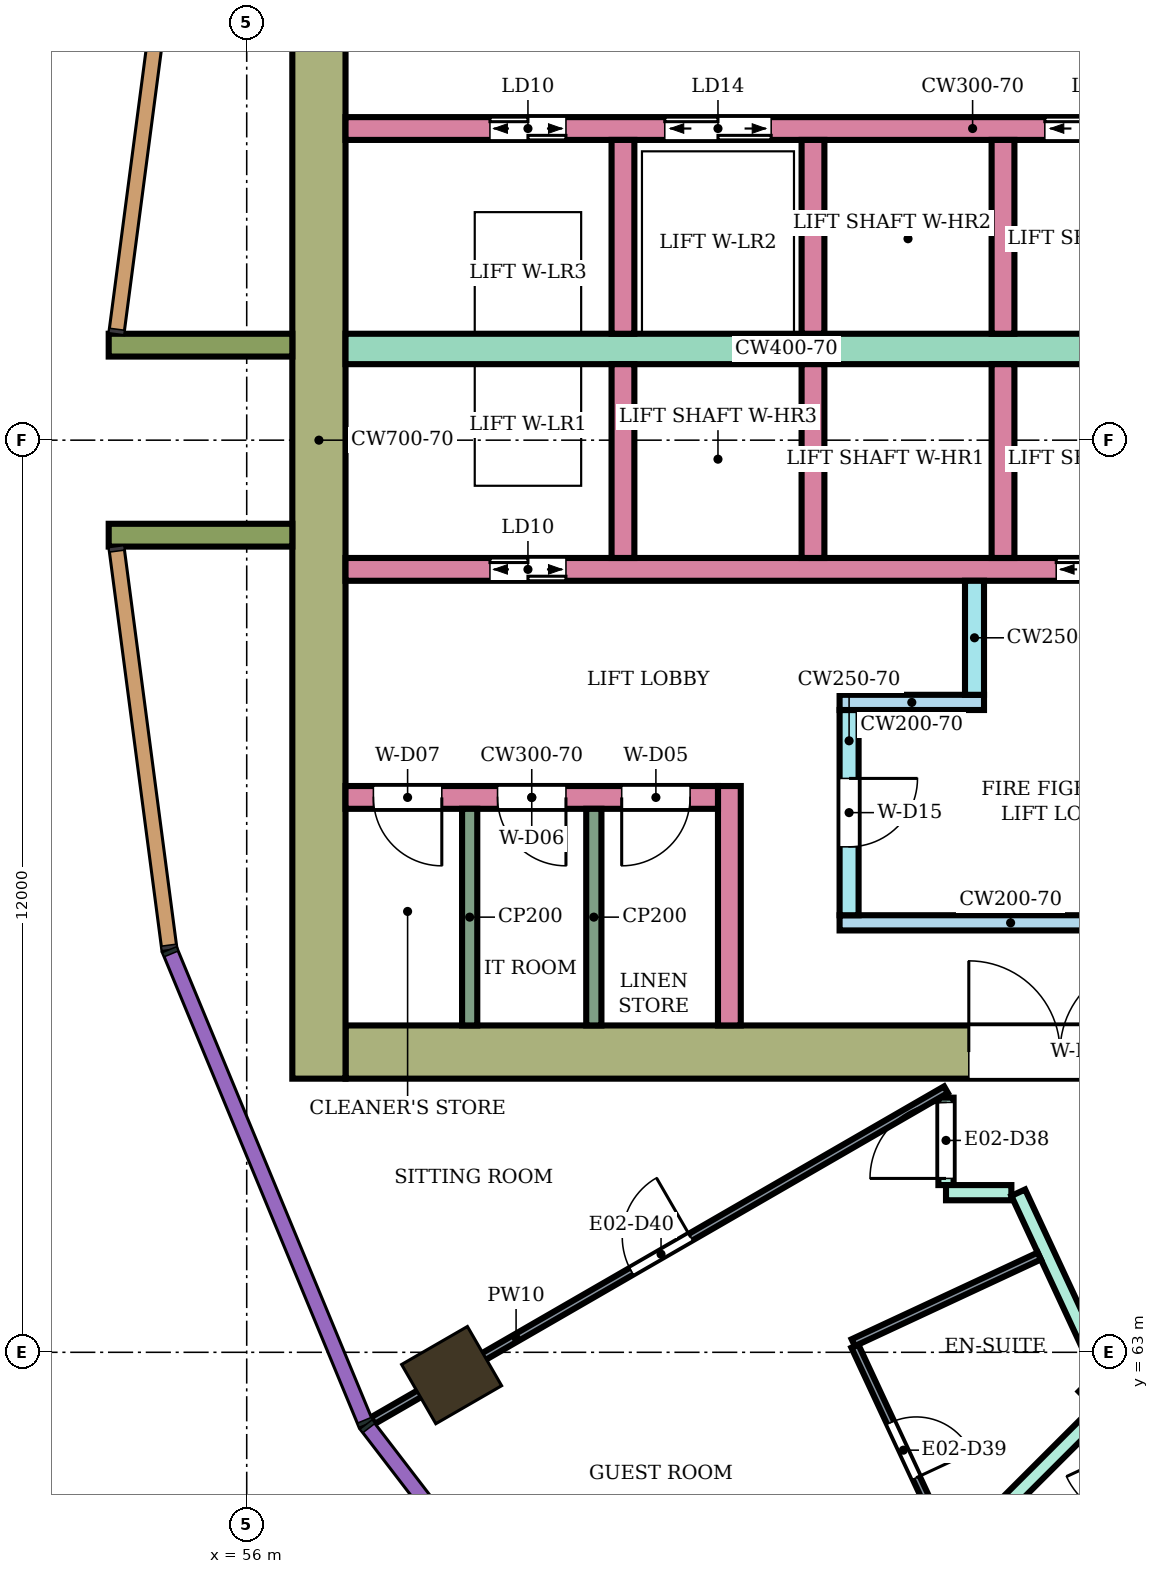
"""IFC4 building model, lengths in metres.
Left out: names, types, materials, properties, quantities, classifications, styles, units other than length and angle.
Written with IfcOpenShell. Run it as: python <this file> out.ifc"""

import sys

from ifc_helpers import new_model, si_unit, direction, frame, frame_2d, origin, origin_2d, place, context, subcontext, project, spatial, rectangle, extrude, element, fill, save


model = new_model("IFC4")
c1 = context("Model", 3, precision=1e-05, world=origin(), true_north=direction((0.0, 1.0)))
c2 = subcontext(c1, "Body", "Model", "MODEL_VIEW")
j1 = project(units=[si_unit("LENGTHUNIT", "METRE"), si_unit("PLANEANGLEUNIT", "RADIAN")], contexts=[c1])
p1 = place(None, origin())
s1 = spatial("IfcSite", under=j1, at=p1, CompositionType="ELEMENT")
p2 = place(p1, origin())
s2 = spatial("IfcBuilding", under=s1, at=p2, CompositionType="ELEMENT")
p3 = place(p2, frame((0.0, 0.0, 130.2)))
s3 = spatial("IfcBuildingStorey", under=s2, at=p3, CompositionType="ELEMENT", Elevation=130.2)
p4 = place(p3, frame((58.696, 62.7, 0.0), z_axis=(0.0, 0.0, 1.0), x_axis=(-0.866025403784, -0.5, 0.0)))
e1 = element("IfcColumn", 1, at=p4, inside=s3, PredefinedType="COLUMN", context=c2, shape_type="SweptSolid", body=[
    extrude(rectangle(XDim=1.0, YDim=0.9, at=origin_2d()), origin(), (0.0, 0.0, 1.0), 3.9),
])
p5 = place(p3, frame((67.555, 62.555, 0.0), z_axis=(0.0, 0.0, 1.0), x_axis=(-0.707106781187, -0.707106781187, 0.0)))
e2 = element("IfcColumn", 2, at=p5, inside=s3, PredefinedType="COLUMN", context=c2, shape_type="SweptSolid", body=[
    extrude(rectangle(XDim=1.0, YDim=0.8, at=origin_2d()), origin(), (0.0, 0.0, 1.0), 3.9),
])
p6 = place(p3, frame((72.1, 66.95, 0.0), z_axis=(0.0, 0.0, 1.0), x_axis=(-1.0, 0.0, 0.0)))
e3 = element("IfcWall", 3, at=p6, inside=s3, PredefinedType="SHEAR", context=c2, shape_type="SweptSolid", body=[
    extrude(rectangle(XDim=14.8, YDim=0.7, at=frame_2d((7.4, 0.0))), origin(), (0.0, 0.0, 1.0), 3.58),
])
p7 = place(p6, frame((4.2, 0.0, 0.0)))
e4 = element("IfcOpeningElement", 4, at=p7, cuts=e3, PredefinedType="OPENING", context=c2, shape_type="SweptSolid", body=[
    extrude(rectangle(XDim=2.4, YDim=2.4, at=frame_2d((1.2, 1.2))), frame((0.0, 0.36, 0.0), z_axis=(0.0, -1.0, 0.0), x_axis=(1.0, 0.0, 0.0)), (0.0, 0.0, 1.0), 0.72),
])
p8 = place(p3, frame((56.95, 83.4, 0.0), z_axis=(0.0, 0.0, 1.0), x_axis=(0.0, -1.0, 0.0)))
e5 = element("IfcWall", 5, at=p8, inside=s3, PredefinedType="SHEAR", context=c2, shape_type="SweptSolid", body=[
    extrude(rectangle(XDim=16.8, YDim=0.7, at=frame_2d((8.4, 0.0))), origin(), (0.0, 0.0, 1.0), 3.58),
])
p9 = place(p3, frame((68.3, 73.3, 0.0), z_axis=(0.0, 0.0, 1.0), x_axis=(-1.0, 0.0, 0.0)))
e6 = element("IfcWall", 6, at=p9, inside=s3, PredefinedType="SHEAR", context=c2, shape_type="SweptSolid", body=[
    extrude(rectangle(XDim=11.0, YDim=0.3, at=frame_2d((5.5, 0.0))), origin(), (0.0, 0.0, 1.0), 3.58),
])
p10 = place(p9, frame((0.55, 0.0, 0.0)))
e7 = element("IfcOpeningElement", 7, at=p10, cuts=e6, PredefinedType="OPENING", context=c2, shape_type="SweptSolid", body=[
    extrude(rectangle(XDim=1.1, YDim=2.1, at=frame_2d((0.55, 1.05))), frame((0.0, 0.16, 0.0), z_axis=(0.0, -1.0, 0.0), x_axis=(1.0, 0.0, 0.0)), (0.0, 0.0, 1.0), 0.32),
])
p11 = place(p9, frame((8.1, 0.0, 0.0)))
e8 = element("IfcOpeningElement", 8, at=p11, cuts=e6, PredefinedType="OPENING", context=c2, shape_type="SweptSolid", body=[
    extrude(rectangle(XDim=1.0, YDim=2.1, at=frame_2d((0.5, 1.05))), frame((0.0, 0.16, 0.0), z_axis=(0.0, -1.0, 0.0), x_axis=(1.0, 0.0, 0.0)), (0.0, 0.0, 1.0), 0.32),
])
p12 = place(p3, frame((68.3, 76.2, 0.0), z_axis=(0.0, 0.0, 1.0), x_axis=(-1.0, 0.0, 0.0)))
e9 = element("IfcWall", 9, at=p12, inside=s3, PredefinedType="SHEAR", context=c2, shape_type="SweptSolid", body=[
    extrude(rectangle(XDim=11.0, YDim=0.4, at=frame_2d((5.5, 0.0))), origin(), (0.0, 0.0, 1.0), 3.58),
])
p13 = place(p3, frame((68.3, 79.1, 0.0), z_axis=(0.0, 0.0, 1.0), x_axis=(-1.0, 0.0, 0.0)))
e10 = element("IfcWall", 10, at=p13, inside=s3, PredefinedType="SHEAR", context=c2, shape_type="SweptSolid", body=[
    extrude(rectangle(XDim=11.0, YDim=0.3, at=frame_2d((5.5, 0.0))), origin(), (0.0, 0.0, 1.0), 3.58),
])
p14 = place(p13, frame((0.4, 0.0, 0.0)))
e11 = element("IfcOpeningElement", 11, at=p14, cuts=e10, PredefinedType="OPENING", context=c2, shape_type="SweptSolid", body=[
    extrude(rectangle(XDim=1.4, YDim=2.1, at=frame_2d((0.7, 1.05))), frame((0.0, 0.16, 0.0), z_axis=(0.0, -1.0, 0.0), x_axis=(1.0, 0.0, 0.0)), (0.0, 0.0, 1.0), 0.32),
])
p15 = place(p13, frame((5.4, 0.0, 0.0)))
e12 = element("IfcOpeningElement", 12, at=p15, cuts=e10, PredefinedType="OPENING", context=c2, shape_type="SweptSolid", body=[
    extrude(rectangle(XDim=1.4, YDim=2.1, at=frame_2d((0.7, 1.05))), frame((0.0, 0.16, 0.0), z_axis=(0.0, -1.0, 0.0), x_axis=(1.0, 0.0, 0.0)), (0.0, 0.0, 1.0), 0.32),
])
p16 = place(p13, frame((8.1, 0.0, 0.0)))
e13 = element("IfcOpeningElement", 13, at=p16, cuts=e10, PredefinedType="OPENING", context=c2, shape_type="SweptSolid", body=[
    extrude(rectangle(XDim=1.0, YDim=2.1, at=frame_2d((0.5, 1.05))), frame((0.0, 0.16, 0.0), z_axis=(0.0, -1.0, 0.0), x_axis=(1.0, 0.0, 0.0)), (0.0, 0.0, 1.0), 0.32),
])
for number, where, z_axis, x_axis in (
    (14, (65.95, 76.0, 0.0), (0.0, 0.0, 1.0), (0.0, -1.0, 0.0)),
    (15, (63.45, 76.0, 0.0), (0.0, 0.0, 1.0), (0.0, -1.0, 0.0)),
    (16, (60.95, 76.0, 0.0), (0.0, 0.0, 1.0), (0.0, -1.0, 0.0)),
    (17, (65.95, 78.95, 0.0), (0.0, 0.0, 1.0), (0.0, -1.0, 0.0)),
    (18, (63.45, 78.95, 0.0), (0.0, 0.0, 1.0), (0.0, -1.0, 0.0)),
    (19, (60.95, 78.95, 0.0), (0.0, 0.0, 1.0), (0.0, -1.0, 0.0)),
):
    element("IfcWall", number, at=place(p3, frame(where, z_axis=z_axis, x_axis=x_axis)), inside=s3, PredefinedType="SHEAR", context=c2, shape_type="SweptSolid", body=[
        extrude(rectangle(XDim=2.55, YDim=0.3, at=frame_2d((1.275, 0.0))), origin(), (0.0, 0.0, 1.0), 3.58),
    ])
p17 = place(p3, frame((68.3, 68.65, 0.0), z_axis=(0.0, 0.0, 1.0), x_axis=(-1.0, 0.0, 0.0)))
e20 = element("IfcWall", 20, at=p17, inside=s3, PredefinedType="SHEAR", context=c2, shape_type="SweptSolid", body=[
    extrude(rectangle(XDim=4.5, YDim=0.2, at=frame_2d((2.25, 0.0))), origin(), (0.0, 0.0, 1.0), 3.58),
])
p18 = place(p3, frame((63.925, 71.45, 0.0), z_axis=(0.0, 0.0, 1.0), x_axis=(0.0, -1.0, 0.0)))
e21 = element("IfcWall", 21, at=p18, inside=s3, PredefinedType="SHEAR", context=c2, shape_type="SweptSolid", body=[
    extrude(rectangle(XDim=2.7, YDim=0.25, at=frame_2d((1.35, 0.0))), origin(), (0.0, 0.0, 1.0), 3.58),
])
p19 = place(p18, frame((0.9, 0.0, 0.0)))
e22 = element("IfcOpeningElement", 22, at=p19, cuts=e21, PredefinedType="OPENING", context=c2, shape_type="SweptSolid", body=[
    extrude(rectangle(XDim=0.9, YDim=2.1, at=frame_2d((0.45, 1.05))), frame((0.0, 0.135, 0.0), z_axis=(0.0, -1.0, 0.0), x_axis=(1.0, 0.0, 0.0)), (0.0, 0.0, 1.0), 0.27),
])
p20 = place(p3, frame((65.7, 71.55, 0.0), z_axis=(0.0, 0.0, 1.0), x_axis=(-1.0, 0.0, 0.0)))
e23 = element("IfcWall", 23, at=p20, inside=s3, PredefinedType="SHEAR", context=c2, shape_type="SweptSolid", body=[
    extrude(rectangle(XDim=1.9, YDim=0.2, at=frame_2d((0.95, 0.0))), origin(), (0.0, 0.0, 1.0), 3.58),
])
p21 = place(p3, frame((65.575, 73.15, 0.0), z_axis=(0.0, 0.0, 1.0), x_axis=(0.0, -1.0, 0.0)))
e24 = element("IfcWall", 24, at=p21, inside=s3, PredefinedType="SHEAR", context=c2, shape_type="SweptSolid", body=[
    extrude(rectangle(XDim=1.5, YDim=0.25, at=frame_2d((0.75, 0.0))), origin(), (0.0, 0.0, 1.0), 3.58),
])
p22 = place(p3, frame((62.35, 70.45, 0.0), z_axis=(0.0, 0.0, 1.0), x_axis=(0.0, -1.0, 0.0)))
e25 = element("IfcWall", 25, at=p22, inside=s3, PredefinedType="SHEAR", context=c2, shape_type="SweptSolid", body=[
    extrude(rectangle(XDim=3.15, YDim=0.3, at=frame_2d((1.575, 0.0))), origin(), (0.0, 0.0, 1.0), 3.58),
])
p23 = place(p3, frame((62.2, 70.3, 0.0), z_axis=(0.0, 0.0, 1.0), x_axis=(-1.0, 0.0, 0.0)))
e26 = element("IfcWall", 26, at=p23, inside=s3, PredefinedType="SHEAR", context=c2, shape_type="SweptSolid", body=[
    extrude(rectangle(XDim=4.9, YDim=0.3, at=frame_2d((2.45, 0.0))), origin(), (0.0, 0.0, 1.0), 3.58),
])
p24 = place(p23, frame((0.367, 0.0, 0.0)))
e27 = element("IfcOpeningElement", 27, at=p24, cuts=e26, PredefinedType="OPENING", context=c2, shape_type="SweptSolid", body=[
    extrude(rectangle(XDim=0.9, YDim=2.1, at=frame_2d((0.45, 1.05))), frame((0.0, 0.16, 0.0), z_axis=(0.0, -1.0, 0.0), x_axis=(1.0, 0.0, 0.0)), (0.0, 0.0, 1.0), 0.32),
])
p25 = place(p23, frame((2.0, 0.0, 0.0)))
e28 = element("IfcOpeningElement", 28, at=p25, cuts=e26, PredefinedType="OPENING", context=c2, shape_type="SweptSolid", body=[
    extrude(rectangle(XDim=0.9, YDim=2.1, at=frame_2d((0.45, 1.05))), frame((0.0, 0.16, 0.0), z_axis=(0.0, -1.0, 0.0), x_axis=(1.0, 0.0, 0.0)), (0.0, 0.0, 1.0), 0.32),
])
p26 = place(p23, frame((3.633, 0.0, 0.0)))
e29 = element("IfcOpeningElement", 29, at=p26, cuts=e26, PredefinedType="OPENING", context=c2, shape_type="SweptSolid", body=[
    extrude(rectangle(XDim=0.9, YDim=2.1, at=frame_2d((0.45, 1.05))), frame((0.0, 0.16, 0.0), z_axis=(0.0, -1.0, 0.0), x_axis=(1.0, 0.0, 0.0)), (0.0, 0.0, 1.0), 0.32),
])
for number, where, z_axis, x_axis in (
    (30, (56.6, 76.25, 0.0), (0.0, 0.0, 1.0), (-1.0, 0.0, 0.0)),
    (31, (56.6, 73.75, 0.0), (0.0, 0.0, 1.0), (-1.0, 0.0, 0.0)),
):
    element("IfcWall", number, at=place(p3, frame(where, z_axis=z_axis, x_axis=x_axis)), inside=s3, PredefinedType="NOTDEFINED", context=c2, shape_type="SweptSolid", body=[
        extrude(rectangle(XDim=2.416, YDim=0.3, at=frame_2d((1.208, 0.0))), origin(), (0.0, 0.0, 1.0), 3.9),
    ])
p27 = place(p3, frame((63.592, 58.599, 0.0), z_axis=(0.0, 0.0, 1.0), x_axis=(0.707292886396, 0.706920626982, 0.0)))
e32 = element("IfcWall", 32, at=p27, inside=s3, PredefinedType="PARTITIONING", context=c2, shape_type="SweptSolid", body=[
    extrude(rectangle(XDim=5.247, YDim=0.2, at=frame_2d((2.623, 0.0))), origin(), (0.0, 0.0, 1.0), 3.45),
])
p28 = place(p3, frame((65.2, 65.2, 0.0), z_axis=(0.0, 0.0, 1.0), x_axis=(0.0, 1.0, 0.0)))
e33 = element("IfcWall", 33, at=p28, inside=s3, PredefinedType="PARTITIONING", context=c2, shape_type="SweptSolid", body=[
    extrude(rectangle(XDim=1.15, YDim=0.2, at=frame_2d((0.575, 0.0))), origin(), (0.0, 0.0, 1.0), 3.45),
])
p29 = place(p28, frame((0.087, 0.0, 0.0)))
e34 = element("IfcOpeningElement", 34, at=p29, cuts=e33, PredefinedType="OPENING", context=c2, shape_type="SweptSolid", body=[
    extrude(rectangle(XDim=1.0, YDim=2.1, at=frame_2d((0.5, 1.05))), frame((0.0, 0.11, 0.0), z_axis=(0.0, -1.0, 0.0), x_axis=(1.0, 0.0, 0.0)), (0.0, 0.0, 1.0), 0.22),
])
p30 = place(p3, frame((65.2, 65.1, 0.0), z_axis=(0.0, 0.0, 1.0), x_axis=(1.0, 0.0, 0.0)))
e35 = element("IfcWall", 35, at=p30, inside=s3, PredefinedType="PARTITIONING", context=c2, shape_type="SweptSolid", body=[
    extrude(rectangle(XDim=0.86, YDim=0.2, at=frame_2d((0.43, 0.0))), origin(), (0.0, 0.0, 1.0), 3.45),
])
p31 = place(p3, frame((66.15, 65.1, 0.0), z_axis=(0.0, 0.0, 1.0), x_axis=(0.421814710342, -0.906682055706, 0.0)))
e36 = element("IfcWall", 36, at=p31, inside=s3, PredefinedType="PARTITIONING", context=c2, shape_type="SweptSolid", body=[
    extrude(rectangle(XDim=8.228, YDim=0.2, at=frame_2d((4.114, 0.0))), origin(), (0.0, 0.0, 1.0), 3.45),
])
p32 = place(p31, frame((3.654, 0.0, 0.0)))
e37 = element("IfcOpeningElement", 37, at=p32, cuts=e36, PredefinedType="OPENING", context=c2, shape_type="SweptSolid", body=[
    extrude(rectangle(XDim=1.0, YDim=2.1, at=frame_2d((0.5, 1.05))), frame((0.0, 0.11, 0.0), z_axis=(0.0, -1.0, 0.0), x_axis=(1.0, 0.0, 0.0)), (0.0, 0.0, 1.0), 0.22),
])
p33 = place(p3, frame((57.659, 62.101, 0.0), z_axis=(0.0, 0.0, 1.0), x_axis=(0.86602264145, 0.500004784474, 0.0)))
e38 = element("IfcWall", 38, at=p33, inside=s3, PredefinedType="PARTITIONING", context=c2, shape_type="SweptSolid", body=[
    extrude(rectangle(XDim=8.708, YDim=0.1, at=frame_2d((4.354, 0.0))), origin(), (0.0, 0.0, 1.0), 3.45),
])
p34 = place(p33, frame((3.929, 0.0, 0.0)))
e39 = element("IfcOpeningElement", 39, at=p34, cuts=e38, PredefinedType="OPENING", context=c2, shape_type="SweptSolid", body=[
    extrude(rectangle(XDim=0.9, YDim=2.1, at=frame_2d((0.45, 1.05))), frame((0.0, 0.06, 0.0), z_axis=(0.0, -1.0, 0.0), x_axis=(1.0, 0.0, 0.0)), (0.0, 0.0, 1.0), 0.12),
])
p35 = place(p3, frame((64.001, 63.082, 0.0), z_axis=(0.0, 0.0, 1.0), x_axis=(0.422271882089, -0.906469225951, 0.0)))
e40 = element("IfcWall", 40, at=p35, inside=s3, PredefinedType="PARTITIONING", context=c2, shape_type="SweptSolid", body=[
    extrude(rectangle(XDim=2.941, YDim=0.1, at=frame_2d((1.471, 0.0))), origin(), (0.0, 0.0, 1.0), 3.45),
])
p36 = place(p35, frame((1.111, 0.0, 0.0)))
e41 = element("IfcOpeningElement", 41, at=p36, cuts=e40, PredefinedType="OPENING", context=c2, shape_type="SweptSolid", body=[
    extrude(rectangle(XDim=0.8, YDim=2.1, at=frame_2d((0.4, 1.05))), frame((0.0, 0.06, 0.0), z_axis=(0.0, -1.0, 0.0), x_axis=(1.0, 0.0, 0.0)), (0.0, 0.0, 1.0), 0.12),
])
p37 = place(p3, frame((63.98, 63.127, 0.0), z_axis=(0.0, 0.0, 1.0), x_axis=(0.90649017149, 0.422226916469, 0.0)))
e42 = element("IfcWall", 42, at=p37, inside=s3, PredefinedType="PARTITIONING", context=c2, shape_type="SweptSolid", body=[
    extrude(rectangle(XDim=2.7, YDim=0.1, at=frame_2d((1.35, 0.0))), origin(), (0.0, 0.0, 1.0), 3.45),
])
for number, where, z_axis, x_axis in (
    (43, (60.567, 70.15, 0.0), (0.0, 0.0, 1.0), (0.0, -1.0, 0.0)),
    (44, (58.933, 70.15, 0.0), (0.0, 0.0, 1.0), (0.0, -1.0, 0.0)),
):
    element("IfcWall", number, at=place(p3, frame(where, z_axis=z_axis, x_axis=x_axis)), inside=s3, PredefinedType="PARTITIONING", context=c2, shape_type="SweptSolid", body=[
        extrude(rectangle(XDim=2.85, YDim=0.2, at=frame_2d((1.425, 0.0))), origin(), (0.0, 0.0, 1.0), 3.58),
    ])
p38 = place(p29, origin())
e45 = element("IfcDoor", 45, at=p38, inside=s3, OperationType="SINGLE_SWING_LEFT", PredefinedType="DOOR", context=c2, shape_type="SweptSolid", body=[
    extrude(rectangle(XDim=1.0, YDim=2.1, at=frame_2d((0.5, 1.05))), frame((0.0, 0.025, 0.0), z_axis=(0.0, -1.0, 0.0), x_axis=(1.0, 0.0, 0.0)), (0.0, 0.0, 1.0), 0.05),
])
fill(e34, e45)
p39 = place(p36, origin())
e46 = element("IfcDoor", 46, at=p39, inside=s3, OperationType="SINGLE_SWING_RIGHT", PredefinedType="DOOR", context=c2, shape_type="SweptSolid", body=[
    extrude(rectangle(XDim=0.8, YDim=2.1, at=frame_2d((0.4, 1.05))), frame((0.0, 0.025, 0.0), z_axis=(0.0, -1.0, 0.0), x_axis=(1.0, 0.0, 0.0)), (0.0, 0.0, 1.0), 0.05),
])
fill(e41, e46)
p40 = place(p34, origin())
e47 = element("IfcDoor", 47, at=p40, inside=s3, OperationType="SINGLE_SWING_RIGHT", PredefinedType="DOOR", context=c2, shape_type="SweptSolid", body=[
    extrude(rectangle(XDim=0.9, YDim=2.1, at=frame_2d((0.45, 1.05))), frame((0.0, 0.025, 0.0), z_axis=(0.0, -1.0, 0.0), x_axis=(1.0, 0.0, 0.0)), (0.0, 0.0, 1.0), 0.05),
])
fill(e39, e47)
p41 = place(p10, origin())
e48 = element("IfcDoor", 48, at=p41, inside=s3, OperationType="DOUBLE_DOOR_SLIDING", PredefinedType="DOOR", context=c2, shape_type="SweptSolid", body=[
    extrude(rectangle(XDim=1.1, YDim=2.1, at=frame_2d((0.55, 1.05))), frame((0.0, 0.025, 0.0), z_axis=(0.0, -1.0, 0.0), x_axis=(1.0, 0.0, 0.0)), (0.0, 0.0, 1.0), 0.05),
])
fill(e7, e48)
p42 = place(p11, origin())
e49 = element("IfcDoor", 49, at=p42, inside=s3, OperationType="DOUBLE_DOOR_SLIDING", PredefinedType="DOOR", context=c2, shape_type="SweptSolid", body=[
    extrude(rectangle(XDim=1.0, YDim=2.1, at=frame_2d((0.5, 1.05))), frame((0.0, 0.025, 0.0), z_axis=(0.0, -1.0, 0.0), x_axis=(1.0, 0.0, 0.0)), (0.0, 0.0, 1.0), 0.05),
])
fill(e8, e49)
p43 = place(p14, origin())
e50 = element("IfcDoor", 50, at=p43, inside=s3, OperationType="DOUBLE_DOOR_SLIDING", PredefinedType="DOOR", context=c2, shape_type="SweptSolid", body=[
    extrude(rectangle(XDim=1.4, YDim=2.1, at=frame_2d((0.7, 1.05))), frame((0.0, 0.025, 0.0), z_axis=(0.0, -1.0, 0.0), x_axis=(1.0, 0.0, 0.0)), (0.0, 0.0, 1.0), 0.05),
])
fill(e11, e50)
p44 = place(p15, origin())
e51 = element("IfcDoor", 51, at=p44, inside=s3, OperationType="DOUBLE_DOOR_SLIDING", PredefinedType="DOOR", context=c2, shape_type="SweptSolid", body=[
    extrude(rectangle(XDim=1.4, YDim=2.1, at=frame_2d((0.7, 1.05))), frame((0.0, 0.025, 0.0), z_axis=(0.0, -1.0, 0.0), x_axis=(1.0, 0.0, 0.0)), (0.0, 0.0, 1.0), 0.05),
])
fill(e12, e51)
p45 = place(p16, origin())
e52 = element("IfcDoor", 52, at=p45, inside=s3, OperationType="DOUBLE_DOOR_SLIDING", PredefinedType="DOOR", context=c2, shape_type="SweptSolid", body=[
    extrude(rectangle(XDim=1.0, YDim=2.1, at=frame_2d((0.5, 1.05))), frame((0.0, 0.025, 0.0), z_axis=(0.0, -1.0, 0.0), x_axis=(1.0, 0.0, 0.0)), (0.0, 0.0, 1.0), 0.05),
])
fill(e13, e52)
p46 = place(p19, origin())
e53 = element("IfcDoor", 53, at=p46, inside=s3, OperationType="SINGLE_SWING_LEFT", PredefinedType="DOOR", context=c2, shape_type="SweptSolid", body=[
    extrude(rectangle(XDim=0.9, YDim=2.1, at=frame_2d((0.45, 1.05))), frame((0.0, 0.025, 0.0), z_axis=(0.0, -1.0, 0.0), x_axis=(1.0, 0.0, 0.0)), (0.0, 0.0, 1.0), 0.05),
])
fill(e22, e53)
p47 = place(p24, origin())
e54 = element("IfcDoor", 54, at=p47, inside=s3, OperationType="SINGLE_SWING_RIGHT", PredefinedType="DOOR", context=c2, shape_type="SweptSolid", body=[
    extrude(rectangle(XDim=0.9, YDim=2.1, at=frame_2d((0.45, 1.05))), frame((0.0, 0.025, 0.0), z_axis=(0.0, -1.0, 0.0), x_axis=(1.0, 0.0, 0.0)), (0.0, 0.0, 1.0), 0.05),
])
fill(e27, e54)
p48 = place(p25, origin())
e55 = element("IfcDoor", 55, at=p48, inside=s3, OperationType="SINGLE_SWING_LEFT", PredefinedType="DOOR", context=c2, shape_type="SweptSolid", body=[
    extrude(rectangle(XDim=0.9, YDim=2.1, at=frame_2d((0.45, 1.05))), frame((0.0, 0.025, 0.0), z_axis=(0.0, -1.0, 0.0), x_axis=(1.0, 0.0, 0.0)), (0.0, 0.0, 1.0), 0.05),
])
fill(e28, e55)
p49 = place(p26, origin())
e56 = element("IfcDoor", 56, at=p49, inside=s3, OperationType="SINGLE_SWING_LEFT", PredefinedType="DOOR", context=c2, shape_type="SweptSolid", body=[
    extrude(rectangle(XDim=0.9, YDim=2.1, at=frame_2d((0.45, 1.05))), frame((0.0, 0.025, 0.0), z_axis=(0.0, -1.0, 0.0), x_axis=(1.0, 0.0, 0.0)), (0.0, 0.0, 1.0), 0.05),
])
fill(e29, e56)
p50 = place(p7, frame((2.4, 0.0, 0.0), z_axis=(0.0, 0.0, 1.0), x_axis=(-1.0, 0.0, 0.0)))
e57 = element("IfcDoor", 57, at=p50, inside=s3, OperationType="DOUBLE_DOOR_SINGLE_SWING", PredefinedType="DOOR", context=c2, shape_type="SweptSolid", body=[
    extrude(rectangle(XDim=2.4, YDim=2.4, at=frame_2d((1.2, 1.2))), frame((0.0, 0.025, 0.0), z_axis=(0.0, -1.0, 0.0), x_axis=(1.0, 0.0, 0.0)), (0.0, 0.0, 1.0), 0.05),
])
fill(e4, e57)
save(model, sys.argv[1])
